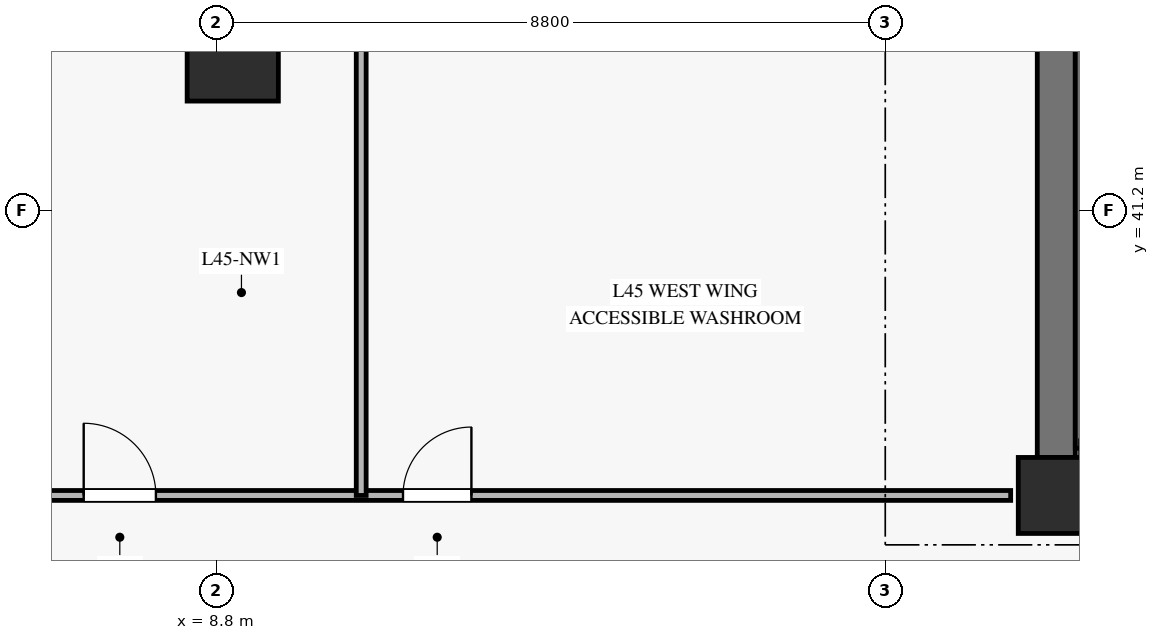
"""IFC4 building model, lengths in metres.
Left out: names, types, materials, properties, quantities, classifications, styles, units other than length and angle.
Written with IfcOpenShell. Run it as: python <this file> out.ifc"""

import sys

from ifc_helpers import new_model, si_unit, direction, frame, frame_2d, origin, origin_2d, place, context, subcontext, project, spatial, rectangle, hollow_rectangle, extrude, source, transform, mapped, element, fill, save


model = new_model("IFC4")
c1 = context("Model", 3, precision=1e-05, world=origin(), true_north=direction((0.0, 1.0)))
c2 = subcontext(c1, "Body", "Model", "MODEL_VIEW")
j1 = project(units=[si_unit("LENGTHUNIT", "METRE"), si_unit("PLANEANGLEUNIT", "RADIAN")], contexts=[c1])
p1 = place(None, origin())
s1 = spatial("IfcSite", under=j1, at=p1, CompositionType="ELEMENT")
p2 = place(p1, origin())
s2 = spatial("IfcBuilding", under=s1, at=p2, CompositionType="ELEMENT")
p3 = place(p2, frame((0.0, 0.0, 180.7)))
s3 = spatial("IfcBuildingStorey", under=s2, at=p3, CompositionType="ELEMENT", Elevation=180.7)
m1 = source(origin(), c2, "Body", "SweptSolid", [
    extrude(rectangle(XDim=1.0, YDim=1.0, at=origin_2d()), origin(), (0.0, 0.0, 1.0), 3.27),
])
p4 = place(p3, frame((19.85, 37.45, 0.0), z_axis=(0.0, 0.0, 1.0), x_axis=(1.0, 0.0, 0.0)))
e1 = element("IfcColumn", 1, at=p4, inside=s3, PredefinedType="PILASTER", context=c2, shape_type="MappedRepresentation", body=[
    mapped(m1, transform((0.0, 0.0, 0.0), x_axis=(1.0, 0.0, 0.0), y_axis=(0.0, 1.0, 0.0), z_axis=(0.0, 0.0, 1.0), scale=1.0)),
])
p5 = place(p3, frame((19.85, 37.95, 0.0), z_axis=(0.0, 0.0, 1.0), x_axis=(0.0, 1.0, 0.0)))
e2 = element("IfcWall", 2, at=p5, inside=s3, PredefinedType="SHEAR", context=c2, shape_type="SweptSolid", body=[
    extrude(rectangle(XDim=8.1, YDim=0.5, at=frame_2d((4.05, 0.0))), origin(), (0.0, 0.0, 1.0), 3.27),
])
m2 = source(origin(), c2, "Body", "SweptSolid", [
    extrude(hollow_rectangle(XDim=1.2, YDim=1.2, WallThickness=0.055, at=origin_2d()), origin(), (0.0, 0.0, 1.0), 3.27),
])
p6 = place(p3, frame((9.015, 43.239, 0.0), z_axis=(0.0, 0.0, 1.0), x_axis=(1.0, 0.0, 0.0)))
e3 = element("IfcColumn", 3, at=p6, inside=s3, PredefinedType="COLUMN", context=c2, shape_type="MappedRepresentation", body=[
    mapped(m2, transform((0.0, 0.0, 0.0), x_axis=(1.0, 0.0, 0.0), y_axis=(0.0, 1.0, 0.0), z_axis=(0.0, 0.0, 1.0), scale=1.0)),
])
p7 = place(p3, frame((8.665, 46.25, 0.0), z_axis=(0.0, 0.0, 1.0), x_axis=(-0.640459985381, -0.767991541051, 0.0)))
e4 = element("IfcWall", 4, at=p7, inside=s3, PredefinedType="SOLIDWALL", context=c2, shape_type="SweptSolid", body=[
    extrude(rectangle(XDim=3.921, YDim=0.3, at=frame_2d((1.96, 0.0))), origin(), (0.0, 0.0, 1.0), 2.75),
])
p8 = place(p7, frame((1.16, 0.0, 0.45)))
e5 = element("IfcOpeningElement", 5, at=p8, cuts=e4, PredefinedType="OPENING", context=c2, shape_type="SweptSolid", body=[
    extrude(rectangle(XDim=1.6, YDim=2.0, at=frame_2d((0.8, 1.0))), frame((0.0, 0.16, 0.0), z_axis=(0.0, -1.0, 0.0), x_axis=(1.0, 0.0, 0.0)), (0.0, 0.0, 1.0), 0.32),
])
p9 = place(p3, frame((20.17, 38.07, 0.0), z_axis=(0.0, 0.0, 1.0), x_axis=(0.0, 1.0, 0.0)))
e6 = element("IfcWall", 6, at=p9, inside=s3, PredefinedType="SOLIDWALL", context=c2, shape_type="SweptSolid", body=[
    extrude(rectangle(XDim=7.25, YDim=0.14, at=frame_2d((3.625, 0.0))), origin(), (0.0, 0.0, 1.0), 3.5),
])
p10 = place(p3, frame((6.154, 37.45, 0.0), z_axis=(0.0, 0.0, 1.0), x_axis=(1.0, 0.0, 0.0)))
e7 = element("IfcWall", 7, at=p10, inside=s3, PredefinedType="PARTITIONING", context=c2, shape_type="SweptSolid", body=[
    extrude(rectangle(XDim=13.096, YDim=0.13, at=frame_2d((6.548, 0.0))), origin(), (0.0, 0.0, 1.0), 2.755),
])
p11 = place(p10, frame((0.9, 0.0, 0.0)))
e8 = element("IfcOpeningElement", 8, at=p11, cuts=e7, PredefinedType="OPENING", context=c2, shape_type="SweptSolid", body=[
    extrude(rectangle(XDim=0.95, YDim=2.1, at=frame_2d((0.475, 1.05))), frame((0.0, 0.075, 0.0), z_axis=(0.0, -1.0, 0.0), x_axis=(1.0, 0.0, 0.0)), (0.0, 0.0, 1.0), 0.15),
])
p12 = place(p10, frame((5.101, 0.0, 0.0)))
e9 = element("IfcOpeningElement", 9, at=p12, cuts=e7, PredefinedType="OPENING", context=c2, shape_type="SweptSolid", body=[
    extrude(rectangle(XDim=0.9, YDim=2.1, at=frame_2d((0.45, 1.05))), frame((0.0, 0.075, 0.0), z_axis=(0.0, -1.0, 0.0), x_axis=(1.0, 0.0, 0.0)), (0.0, 0.0, 1.0), 0.15),
])
p13 = place(p3, frame((10.705, 37.45, 0.0), z_axis=(0.0, 0.0, 1.0), x_axis=(0.0, 1.0, 0.0)))
e10 = element("IfcWall", 10, at=p13, inside=s3, PredefinedType="PARTITIONING", context=c2, shape_type="SweptSolid", body=[
    extrude(rectangle(XDim=8.8, YDim=0.13, at=frame_2d((4.4, 0.0))), origin(), (0.0, 0.0, 1.0), 3.27),
])
m3 = source(origin(), c2, "Body", "SweptSolid", [
    extrude(rectangle(XDim=0.95, YDim=2.1, at=frame_2d((0.475, 1.05))), frame((0.0, 0.025, 0.0), z_axis=(0.0, -1.0, 0.0), x_axis=(1.0, 0.0, 0.0)), (0.0, 0.0, 1.0), 0.05),
])
p14 = place(p11, origin())
e11 = element("IfcDoor", 11, at=p14, inside=s3, OperationType="SINGLE_SWING_LEFT", PredefinedType="DOOR", context=c2, shape_type="MappedRepresentation", body=[
    mapped(m3, transform((0.0, 0.0, 0.0), x_axis=(1.0, 0.0, 0.0), y_axis=(0.0, 1.0, 0.0), z_axis=(0.0, 0.0, 1.0), scale=1.0)),
])
fill(e8, e11)
m4 = source(origin(), c2, "Body", "SweptSolid", [
    extrude(rectangle(XDim=0.9, YDim=2.1, at=frame_2d((0.45, 1.05))), frame((0.0, 0.025, 0.0), z_axis=(0.0, -1.0, 0.0), x_axis=(1.0, 0.0, 0.0)), (0.0, 0.0, 1.0), 0.05),
])
p15 = place(p12, origin())
e12 = element("IfcDoor", 12, at=p15, inside=s3, OperationType="SINGLE_SWING_RIGHT", PredefinedType="DOOR", context=c2, shape_type="MappedRepresentation", body=[
    mapped(m4, transform((0.0, 0.0, 0.0), x_axis=(1.0, 0.0, 0.0), y_axis=(0.0, 1.0, 0.0), z_axis=(0.0, 0.0, 1.0), scale=1.0)),
])
fill(e9, e12)
save(model, sys.argv[1])
